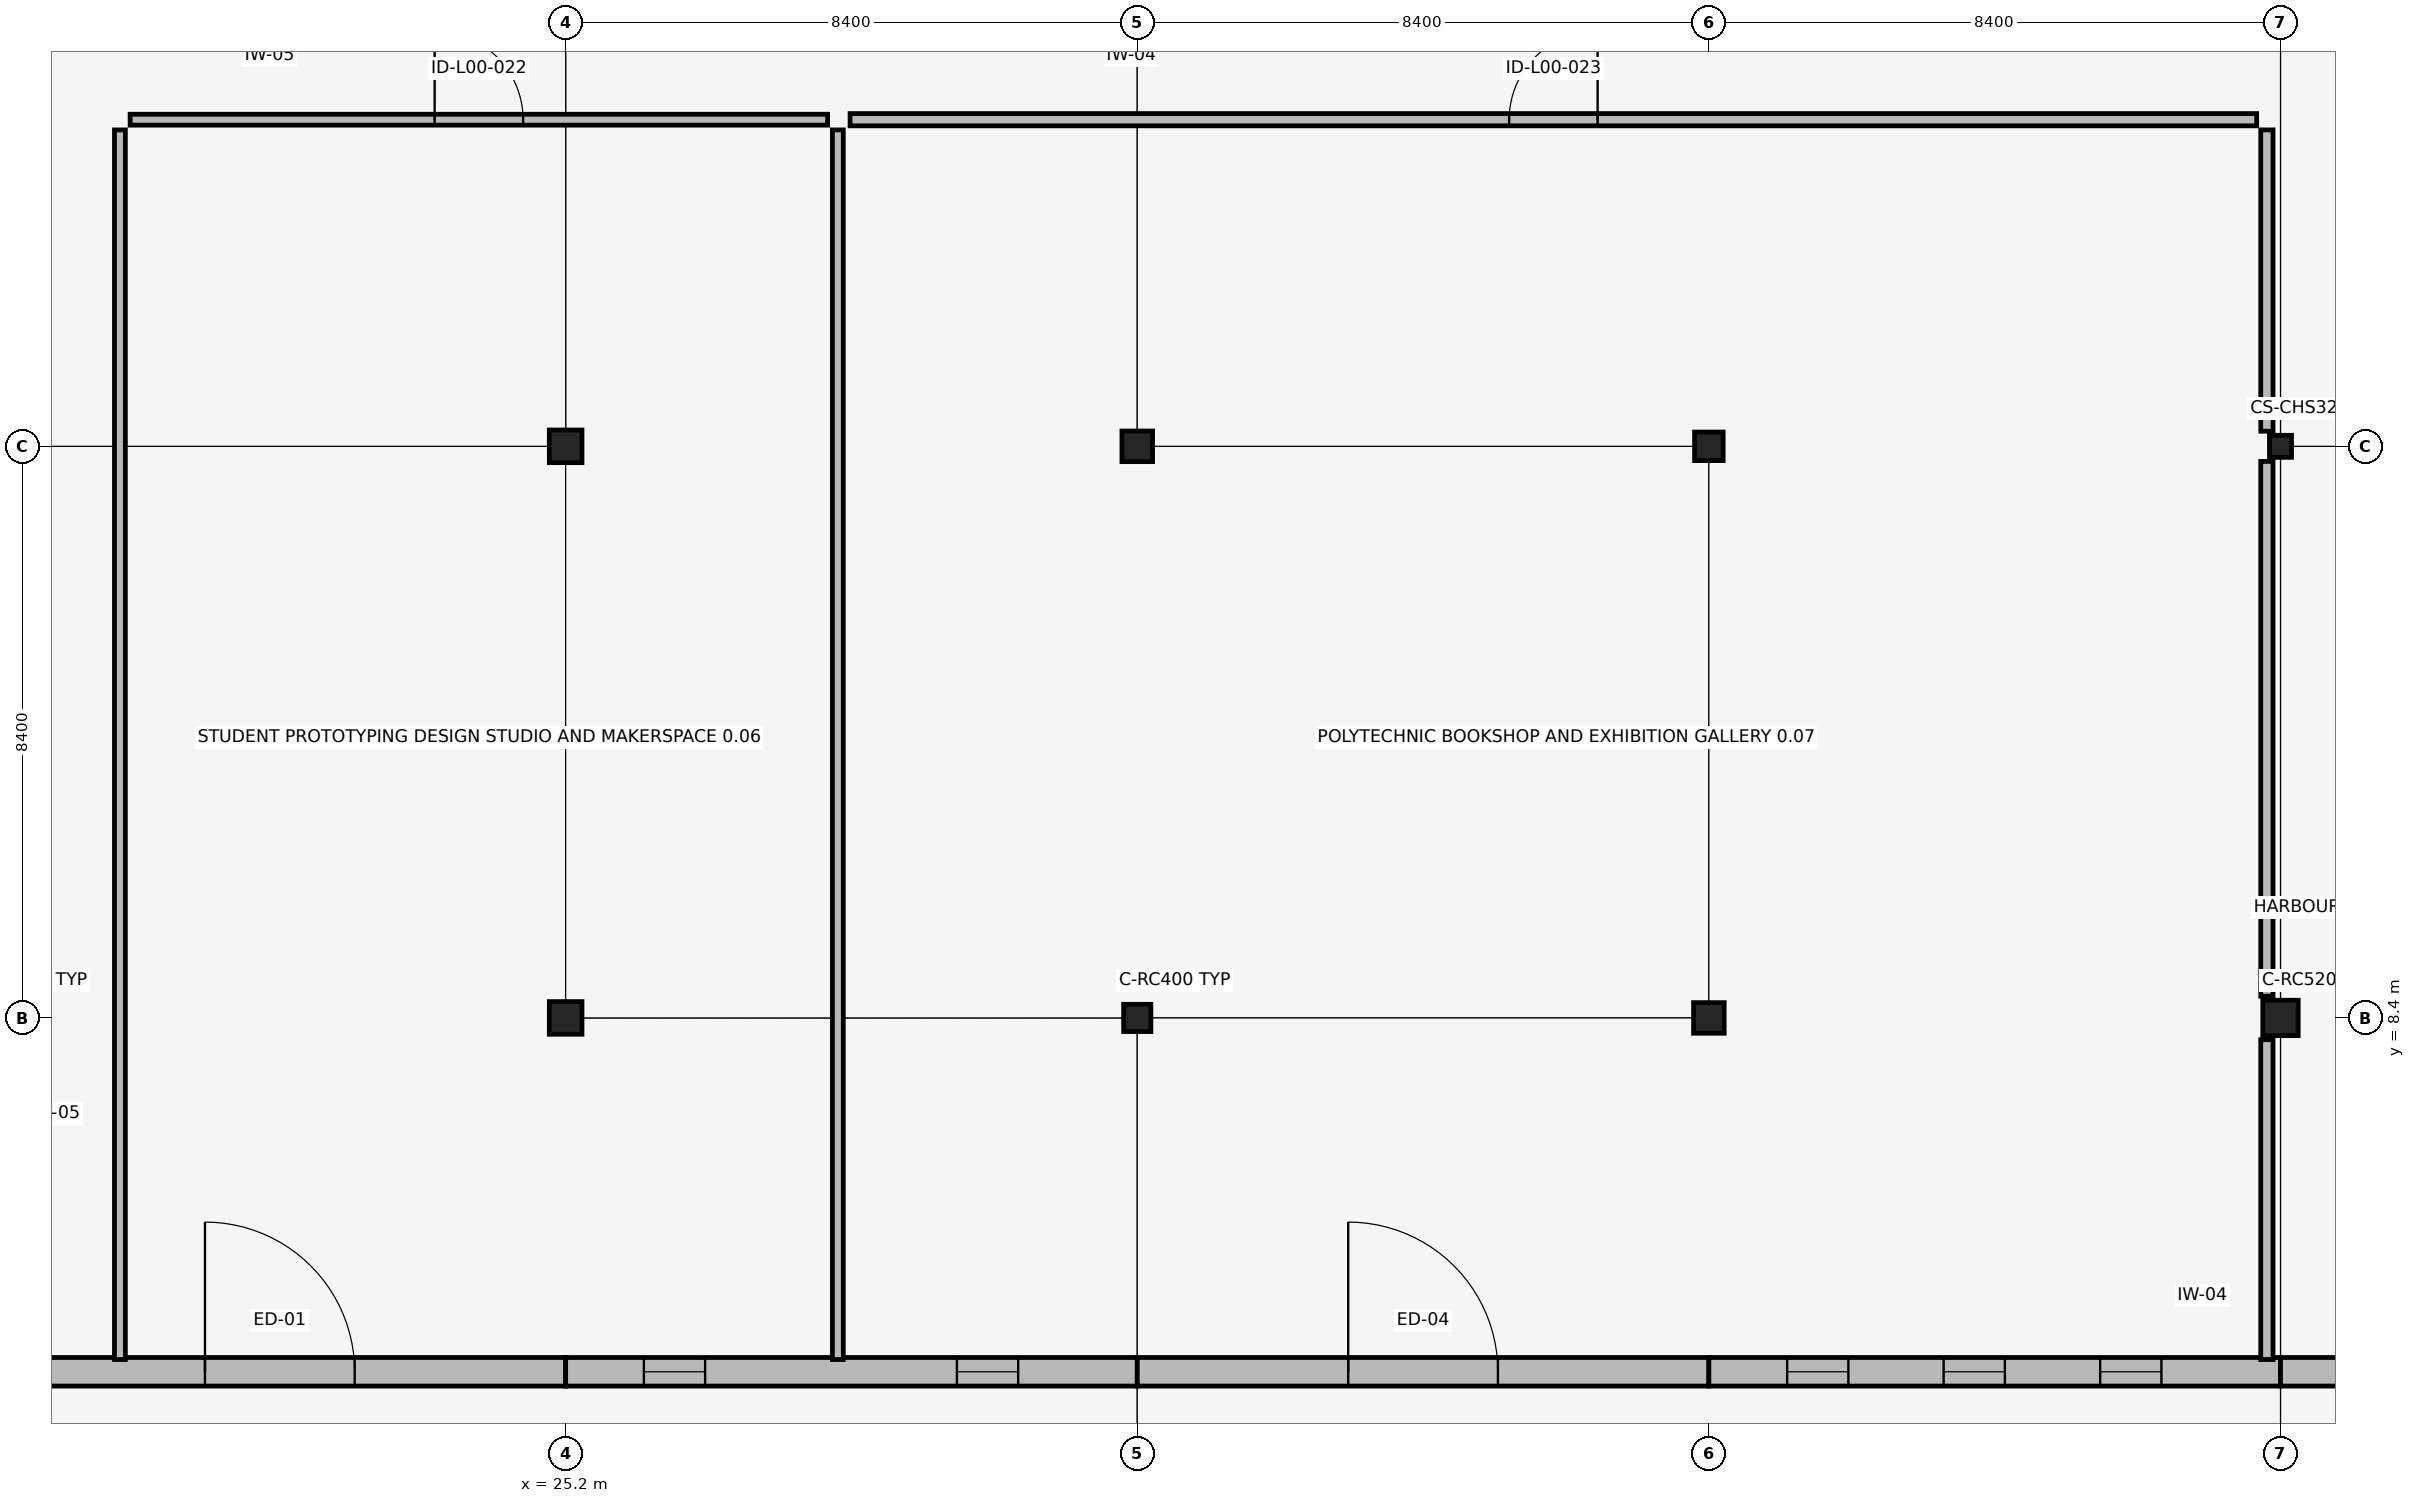
"""IFC4 building model, lengths in metres.
Left out: names, types, materials, properties, quantities, classifications, styles, units other than length and angle.
Written with IfcOpenShell. Run it as: python <this file> out.ifc"""

import sys

from ifc_helpers import new_model, si_unit, direction, frame, frame_2d, origin, origin_2d, place, context, subcontext, project, spatial, rectangle, hollow_circle, extrude, element, fill, save


model = new_model("IFC4")
c1 = context("Model", 3, precision=1e-05, world=origin(), true_north=direction((0.0, 1.0)))
c2 = subcontext(c1, "Body", "Model", "MODEL_VIEW")
j1 = project(units=[si_unit("LENGTHUNIT", "METRE"), si_unit("PLANEANGLEUNIT", "RADIAN")], contexts=[c1])
p1 = place(None, origin())
s1 = spatial("IfcSite", under=j1, at=p1, CompositionType="ELEMENT")
p2 = place(p1, origin())
s2 = spatial("IfcBuilding", under=s1, at=p2, CompositionType="ELEMENT")
p3 = place(p2, origin())
s3 = spatial("IfcBuildingStorey", under=s2, at=p3, CompositionType="ELEMENT", Elevation=0.0)
for number, where, z_axis, x_axis in (
    (1, (25.2, 8.4, -0.32), (0.0, 0.0, 1.0), (1.0, 0.0, 0.0)),
    (2, (25.2, 16.8, -0.32), (0.0, 0.0, 1.0), (1.0, 0.0, 0.0)),
):
    element("IfcColumn", number, at=place(p3, frame(where, z_axis=z_axis, x_axis=x_axis)), inside=s3, PredefinedType="COLUMN", context=c2, shape_type="SweptSolid", body=[
        extrude(rectangle(XDim=0.48, YDim=0.48, at=origin_2d()), origin(), (0.0, 0.0, 1.0), 5.46),
    ])
p4 = place(p3, frame((33.6, 8.4, -0.32), z_axis=(0.0, 0.0, 1.0), x_axis=(1.0, 0.0, 0.0)))
e3 = element("IfcColumn", 3, at=p4, inside=s3, PredefinedType="COLUMN", context=c2, shape_type="SweptSolid", body=[
    extrude(rectangle(XDim=0.4, YDim=0.4, at=origin_2d()), origin(), (0.0, 0.0, 1.0), 5.46),
])
for number, where, z_axis, x_axis in (
    (4, (33.6, 16.8, -0.32), (0.0, 0.0, 1.0), (1.0, 0.0, 0.0)),
    (5, (42.0, 8.4, -0.32), (0.0, 0.0, 1.0), (1.0, 0.0, 0.0)),
):
    element("IfcColumn", number, at=place(p3, frame(where, z_axis=z_axis, x_axis=x_axis)), inside=s3, PredefinedType="COLUMN", context=c2, shape_type="SweptSolid", body=[
        extrude(rectangle(XDim=0.45, YDim=0.45, at=origin_2d()), origin(), (0.0, 0.0, 1.0), 5.46),
    ])
p5 = place(p3, frame((42.0, 16.8, -0.32), z_axis=(0.0, 0.0, 1.0), x_axis=(1.0, 0.0, 0.0)))
e6 = element("IfcColumn", 6, at=p5, inside=s3, PredefinedType="COLUMN", context=c2, shape_type="SweptSolid", body=[
    extrude(rectangle(XDim=0.42, YDim=0.42, at=origin_2d()), origin(), (0.0, 0.0, 1.0), 5.46),
])
p6 = place(p3, frame((50.4, 8.4, 0.0), z_axis=(0.0, 0.0, 1.0), x_axis=(1.0, 0.0, 0.0)))
e7 = element("IfcColumn", 7, at=p6, inside=s3, PredefinedType="COLUMN", context=c2, shape_type="SweptSolid", body=[
    extrude(rectangle(XDim=0.52, YDim=0.52, at=origin_2d()), origin(), (0.0, 0.0, 1.0), 5.14),
])
p7 = place(p3, frame((50.4, 16.8, 0.0), z_axis=(0.0, 0.0, 1.0), x_axis=(1.0, 0.0, 0.0)))
e8 = element("IfcColumn", 8, at=p7, inside=s3, PredefinedType="COLUMN", context=c2, shape_type="SweptSolid", body=[
    extrude(hollow_circle(Radius=0.162, WallThickness=0.016, at=origin_2d()), origin(), (0.0, 0.0, 1.0), 5.14),
])
p8 = place(p3, frame((16.8, 3.2, 0.0), z_axis=(0.0, 0.0, 1.0), x_axis=(1.0, 0.0, 0.0)))
e9 = element("IfcWall", 9, at=p8, inside=s3, PredefinedType="SOLIDWALL", context=c2, shape_type="SweptSolid", body=[
    extrude(rectangle(XDim=8.4, YDim=0.42, at=frame_2d((4.2, 0.0))), origin(), (0.0, 0.0, 1.0), 4.49),
])
p9 = place(p8, frame((3.1, 0.0, 0.0)))
e10 = element("IfcOpeningElement", 10, at=p9, cuts=e9, PredefinedType="OPENING", context=c2, shape_type="SweptSolid", body=[
    extrude(rectangle(XDim=2.2, YDim=2.4, at=frame_2d((1.1, 1.2))), frame((0.0, 0.22, 0.0), z_axis=(0.0, -1.0, 0.0), x_axis=(1.0, 0.0, 0.0)), (0.0, 0.0, 1.0), 0.44),
])
p10 = place(p3, frame((25.2, 3.2, 0.0), z_axis=(0.0, 0.0, 1.0), x_axis=(1.0, 0.0, 0.0)))
e11 = element("IfcWall", 11, at=p10, inside=s3, PredefinedType="SOLIDWALL", context=c2, shape_type="SweptSolid", body=[
    extrude(rectangle(XDim=8.4, YDim=0.42, at=frame_2d((4.2, 0.0))), origin(), (0.0, 0.0, 1.0), 4.49),
])
p11 = place(p10, frame((1.15, 0.0, 0.85)))
e12 = element("IfcOpeningElement", 12, at=p11, cuts=e11, PredefinedType="OPENING", context=c2, shape_type="SweptSolid", body=[
    extrude(rectangle(XDim=0.9, YDim=3.0, at=frame_2d((0.45, 1.5))), frame((0.0, 0.22, 0.0), z_axis=(0.0, -1.0, 0.0), x_axis=(1.0, 0.0, 0.0)), (0.0, 0.0, 1.0), 0.44),
])
p12 = place(p10, frame((5.75, 0.0, 0.85)))
e13 = element("IfcOpeningElement", 13, at=p12, cuts=e11, PredefinedType="OPENING", context=c2, shape_type="SweptSolid", body=[
    extrude(rectangle(XDim=0.9, YDim=3.0, at=frame_2d((0.45, 1.5))), frame((0.0, 0.22, 0.0), z_axis=(0.0, -1.0, 0.0), x_axis=(1.0, 0.0, 0.0)), (0.0, 0.0, 1.0), 0.44),
])
p13 = place(p3, frame((33.6, 3.2, 0.0), z_axis=(0.0, 0.0, 1.0), x_axis=(1.0, 0.0, 0.0)))
e14 = element("IfcWall", 14, at=p13, inside=s3, PredefinedType="SOLIDWALL", context=c2, shape_type="SweptSolid", body=[
    extrude(rectangle(XDim=8.4, YDim=0.42, at=frame_2d((4.2, 0.0))), origin(), (0.0, 0.0, 1.0), 4.49),
])
p14 = place(p13, frame((3.1, 0.0, 0.0)))
e15 = element("IfcOpeningElement", 15, at=p14, cuts=e14, PredefinedType="OPENING", context=c2, shape_type="SweptSolid", body=[
    extrude(rectangle(XDim=2.2, YDim=2.4, at=frame_2d((1.1, 1.2))), frame((0.0, 0.22, 0.0), z_axis=(0.0, -1.0, 0.0), x_axis=(1.0, 0.0, 0.0)), (0.0, 0.0, 1.0), 0.44),
])
p15 = place(p3, frame((42.0, 3.2, 0.0), z_axis=(0.0, 0.0, 1.0), x_axis=(1.0, 0.0, 0.0)))
e16 = element("IfcWall", 16, at=p15, inside=s3, PredefinedType="SOLIDWALL", context=c2, shape_type="SweptSolid", body=[
    extrude(rectangle(XDim=8.4, YDim=0.42, at=frame_2d((4.2, 0.0))), origin(), (0.0, 0.0, 1.0), 4.74),
])
p16 = place(p15, frame((1.15, 0.0, 0.85)))
e17 = element("IfcOpeningElement", 17, at=p16, cuts=e16, PredefinedType="OPENING", context=c2, shape_type="SweptSolid", body=[
    extrude(rectangle(XDim=0.9, YDim=3.0, at=frame_2d((0.45, 1.5))), frame((0.0, 0.22, 0.0), z_axis=(0.0, -1.0, 0.0), x_axis=(1.0, 0.0, 0.0)), (0.0, 0.0, 1.0), 0.44),
])
p17 = place(p15, frame((3.45, 0.0, 0.85)))
e18 = element("IfcOpeningElement", 18, at=p17, cuts=e16, PredefinedType="OPENING", context=c2, shape_type="SweptSolid", body=[
    extrude(rectangle(XDim=0.9, YDim=3.0, at=frame_2d((0.45, 1.5))), frame((0.0, 0.22, 0.0), z_axis=(0.0, -1.0, 0.0), x_axis=(1.0, 0.0, 0.0)), (0.0, 0.0, 1.0), 0.44),
])
p18 = place(p15, frame((5.75, 0.0, 0.85)))
e19 = element("IfcOpeningElement", 19, at=p18, cuts=e16, PredefinedType="OPENING", context=c2, shape_type="SweptSolid", body=[
    extrude(rectangle(XDim=0.9, YDim=3.0, at=frame_2d((0.45, 1.5))), frame((0.0, 0.22, 0.0), z_axis=(0.0, -1.0, 0.0), x_axis=(1.0, 0.0, 0.0)), (0.0, 0.0, 1.0), 0.44),
])
p19 = place(p3, frame((50.4, 3.2, 0.0), z_axis=(0.0, 0.0, 1.0), x_axis=(1.0, 0.0, 0.0)))
e20 = element("IfcWall", 20, at=p19, inside=s3, PredefinedType="SOLIDWALL", context=c2, shape_type="SweptSolid", body=[
    extrude(rectangle(XDim=8.4, YDim=0.42, at=frame_2d((4.2, 0.0))), origin(), (0.0, 0.0, 1.0), 4.83),
])
p20 = place(p19, frame((1.15, 0.0, 0.85)))
e21 = element("IfcOpeningElement", 21, at=p20, cuts=e20, PredefinedType="OPENING", context=c2, shape_type="SweptSolid", body=[
    extrude(rectangle(XDim=0.9, YDim=3.0, at=frame_2d((0.45, 1.5))), frame((0.0, 0.22, 0.0), z_axis=(0.0, -1.0, 0.0), x_axis=(1.0, 0.0, 0.0)), (0.0, 0.0, 1.0), 0.44),
])
p21 = place(p19, frame((3.45, 0.0, 0.85)))
e22 = element("IfcOpeningElement", 22, at=p21, cuts=e20, PredefinedType="OPENING", context=c2, shape_type="SweptSolid", body=[
    extrude(rectangle(XDim=0.9, YDim=3.0, at=frame_2d((0.45, 1.5))), frame((0.0, 0.22, 0.0), z_axis=(0.0, -1.0, 0.0), x_axis=(1.0, 0.0, 0.0)), (0.0, 0.0, 1.0), 0.44),
])
p22 = place(p19, frame((5.75, 0.0, 0.85)))
e23 = element("IfcOpeningElement", 23, at=p22, cuts=e20, PredefinedType="OPENING", context=c2, shape_type="SweptSolid", body=[
    extrude(rectangle(XDim=0.9, YDim=3.0, at=frame_2d((0.45, 1.5))), frame((0.0, 0.22, 0.0), z_axis=(0.0, -1.0, 0.0), x_axis=(1.0, 0.0, 0.0)), (0.0, 0.0, 1.0), 0.44),
])
p23 = place(p3, frame((18.8, 21.6, 0.0), z_axis=(0.0, 0.0, 1.0), x_axis=(1.0, 0.0, 0.0)))
e24 = element("IfcWall", 24, at=p23, inside=s3, PredefinedType="PARTITIONING", context=c2, shape_type="SweptSolid", body=[
    extrude(rectangle(XDim=10.25, YDim=0.16, at=frame_2d((5.125, 0.0))), origin(), (0.0, 0.0, 1.0), 4.74),
])
p24 = place(p23, frame((4.475, 0.0, 0.0)))
e25 = element("IfcOpeningElement", 25, at=p24, cuts=e24, PredefinedType="OPENING", context=c2, shape_type="SweptSolid", body=[
    extrude(rectangle(XDim=1.3, YDim=2.2, at=frame_2d((0.65, 1.1))), frame((0.0, 0.09, 0.0), z_axis=(0.0, -1.0, 0.0), x_axis=(1.0, 0.0, 0.0)), (0.0, 0.0, 1.0), 0.18),
])
for number, where, z_axis, x_axis in (
    (26, (18.65, 3.38, 0.0), (0.0, 0.0, 1.0), (0.0, 1.0, 0.0)),
    (27, (29.2, 3.38, 0.0), (0.0, 0.0, 1.0), (0.0, 1.0, 0.0)),
):
    element("IfcWall", number, at=place(p3, frame(where, z_axis=z_axis, x_axis=x_axis)), inside=s3, PredefinedType="PARTITIONING", context=c2, shape_type="SweptSolid", body=[
        extrude(rectangle(XDim=18.07, YDim=0.16, at=frame_2d((9.035, 0.0))), origin(), (0.0, 0.0, 1.0), 4.36),
    ])
p25 = place(p3, frame((29.38, 21.6, 0.0), z_axis=(0.0, 0.0, 1.0), x_axis=(1.0, 0.0, 0.0)))
e28 = element("IfcWall", 28, at=p25, inside=s3, PredefinedType="PARTITIONING", context=c2, shape_type="SweptSolid", body=[
    extrude(rectangle(XDim=20.67, YDim=0.18, at=frame_2d((10.335, 0.0))), origin(), (0.0, 0.0, 1.0), 4.49),
])
p26 = place(p25, frame((9.685, 0.0, 0.0)))
e29 = element("IfcOpeningElement", 29, at=p26, cuts=e28, PredefinedType="OPENING", context=c2, shape_type="SweptSolid", body=[
    extrude(rectangle(XDim=1.3, YDim=2.2, at=frame_2d((0.65, 1.1))), frame((0.0, 0.1, 0.0), z_axis=(0.0, -1.0, 0.0), x_axis=(1.0, 0.0, 0.0)), (0.0, 0.0, 1.0), 0.2),
])
p27 = place(p3, frame((50.2, 3.38, 0.0), z_axis=(0.0, 0.0, 1.0), x_axis=(0.0, 1.0, 0.0)))
e30 = element("IfcWall", 30, at=p27, inside=s3, PredefinedType="PARTITIONING", context=c2, shape_type="SweptSolid", body=[
    extrude(rectangle(XDim=4.7, YDim=0.18, at=frame_2d((2.35, 0.0))), origin(), (0.0, 0.0, 1.0), 4.39),
])
p28 = place(p3, frame((50.2, 8.72, 0.0), z_axis=(0.0, 0.0, 1.0), x_axis=(0.0, 1.0, 0.0)))
e31 = element("IfcWall", 31, at=p28, inside=s3, PredefinedType="PARTITIONING", context=c2, shape_type="SweptSolid", body=[
    extrude(rectangle(XDim=7.858, YDim=0.18, at=frame_2d((3.929, 0.0))), origin(), (0.0, 0.0, 1.0), 4.36),
])
p29 = place(p3, frame((50.2, 17.022, 0.0), z_axis=(0.0, 0.0, 1.0), x_axis=(0.0, 1.0, 0.0)))
e32 = element("IfcWall", 32, at=p29, inside=s3, PredefinedType="PARTITIONING", context=c2, shape_type="SweptSolid", body=[
    extrude(rectangle(XDim=4.428, YDim=0.18, at=frame_2d((2.214, 0.0))), origin(), (0.0, 0.0, 1.0), 4.36),
])
p30 = place(p9, origin())
e33 = element("IfcDoor", 33, at=p30, inside=s3, OperationType="DOUBLE_DOOR_SINGLE_SWING", PredefinedType="DOOR", context=c2, shape_type="SweptSolid", body=[
    extrude(rectangle(XDim=2.2, YDim=2.4, at=frame_2d((1.1, 1.2))), frame((0.0, 0.025, 0.0), z_axis=(0.0, -1.0, 0.0), x_axis=(1.0, 0.0, 0.0)), (0.0, 0.0, 1.0), 0.05),
])
fill(e10, e33)
p31 = place(p11, origin())
e34 = element("IfcWindow", 34, at=p31, inside=s3, PartitioningType="DOUBLE_PANEL_VERTICAL", PredefinedType="WINDOW", context=c2, shape_type="SweptSolid", body=[
    extrude(rectangle(XDim=0.9, YDim=3.0, at=frame_2d((0.45, 1.5))), frame((0.0, 0.03, 0.0), z_axis=(0.0, -1.0, 0.0), x_axis=(1.0, 0.0, 0.0)), (0.0, 0.0, 1.0), 0.06),
])
fill(e12, e34)
p32 = place(p12, origin())
e35 = element("IfcWindow", 35, at=p32, inside=s3, PartitioningType="DOUBLE_PANEL_VERTICAL", PredefinedType="WINDOW", context=c2, shape_type="SweptSolid", body=[
    extrude(rectangle(XDim=0.9, YDim=3.0, at=frame_2d((0.45, 1.5))), frame((0.0, 0.03, 0.0), z_axis=(0.0, -1.0, 0.0), x_axis=(1.0, 0.0, 0.0)), (0.0, 0.0, 1.0), 0.06),
])
fill(e13, e35)
p33 = place(p14, origin())
e36 = element("IfcDoor", 36, at=p33, inside=s3, OperationType="DOUBLE_DOOR_SINGLE_SWING", PredefinedType="DOOR", context=c2, shape_type="SweptSolid", body=[
    extrude(rectangle(XDim=2.2, YDim=2.4, at=frame_2d((1.1, 1.2))), frame((0.0, 0.025, 0.0), z_axis=(0.0, -1.0, 0.0), x_axis=(1.0, 0.0, 0.0)), (0.0, 0.0, 1.0), 0.05),
])
fill(e15, e36)
p34 = place(p16, origin())
e37 = element("IfcWindow", 37, at=p34, inside=s3, PartitioningType="DOUBLE_PANEL_VERTICAL", PredefinedType="WINDOW", context=c2, shape_type="SweptSolid", body=[
    extrude(rectangle(XDim=0.9, YDim=3.0, at=frame_2d((0.45, 1.5))), frame((0.0, 0.03, 0.0), z_axis=(0.0, -1.0, 0.0), x_axis=(1.0, 0.0, 0.0)), (0.0, 0.0, 1.0), 0.06),
])
fill(e17, e37)
p35 = place(p17, origin())
e38 = element("IfcWindow", 38, at=p35, inside=s3, PartitioningType="DOUBLE_PANEL_VERTICAL", PredefinedType="WINDOW", context=c2, shape_type="SweptSolid", body=[
    extrude(rectangle(XDim=0.9, YDim=3.0, at=frame_2d((0.45, 1.5))), frame((0.0, 0.03, 0.0), z_axis=(0.0, -1.0, 0.0), x_axis=(1.0, 0.0, 0.0)), (0.0, 0.0, 1.0), 0.06),
])
fill(e18, e38)
p36 = place(p18, origin())
e39 = element("IfcWindow", 39, at=p36, inside=s3, PartitioningType="DOUBLE_PANEL_VERTICAL", PredefinedType="WINDOW", context=c2, shape_type="SweptSolid", body=[
    extrude(rectangle(XDim=0.9, YDim=3.0, at=frame_2d((0.45, 1.5))), frame((0.0, 0.03, 0.0), z_axis=(0.0, -1.0, 0.0), x_axis=(1.0, 0.0, 0.0)), (0.0, 0.0, 1.0), 0.06),
])
fill(e19, e39)
p37 = place(p24, origin())
e40 = element("IfcDoor", 40, at=p37, inside=s3, OperationType="SINGLE_SWING_LEFT", PredefinedType="DOOR", context=c2, shape_type="SweptSolid", body=[
    extrude(rectangle(XDim=1.3, YDim=2.2, at=frame_2d((0.65, 1.1))), frame((0.0, 0.025, 0.0), z_axis=(0.0, -1.0, 0.0), x_axis=(1.0, 0.0, 0.0)), (0.0, 0.0, 1.0), 0.05),
])
fill(e25, e40)
p38 = place(p26, origin())
e41 = element("IfcDoor", 41, at=p38, inside=s3, OperationType="SINGLE_SWING_RIGHT", PredefinedType="DOOR", context=c2, shape_type="SweptSolid", body=[
    extrude(rectangle(XDim=1.3, YDim=2.2, at=frame_2d((0.65, 1.1))), frame((0.0, 0.025, 0.0), z_axis=(0.0, -1.0, 0.0), x_axis=(1.0, 0.0, 0.0)), (0.0, 0.0, 1.0), 0.05),
])
fill(e29, e41)
save(model, sys.argv[1])
